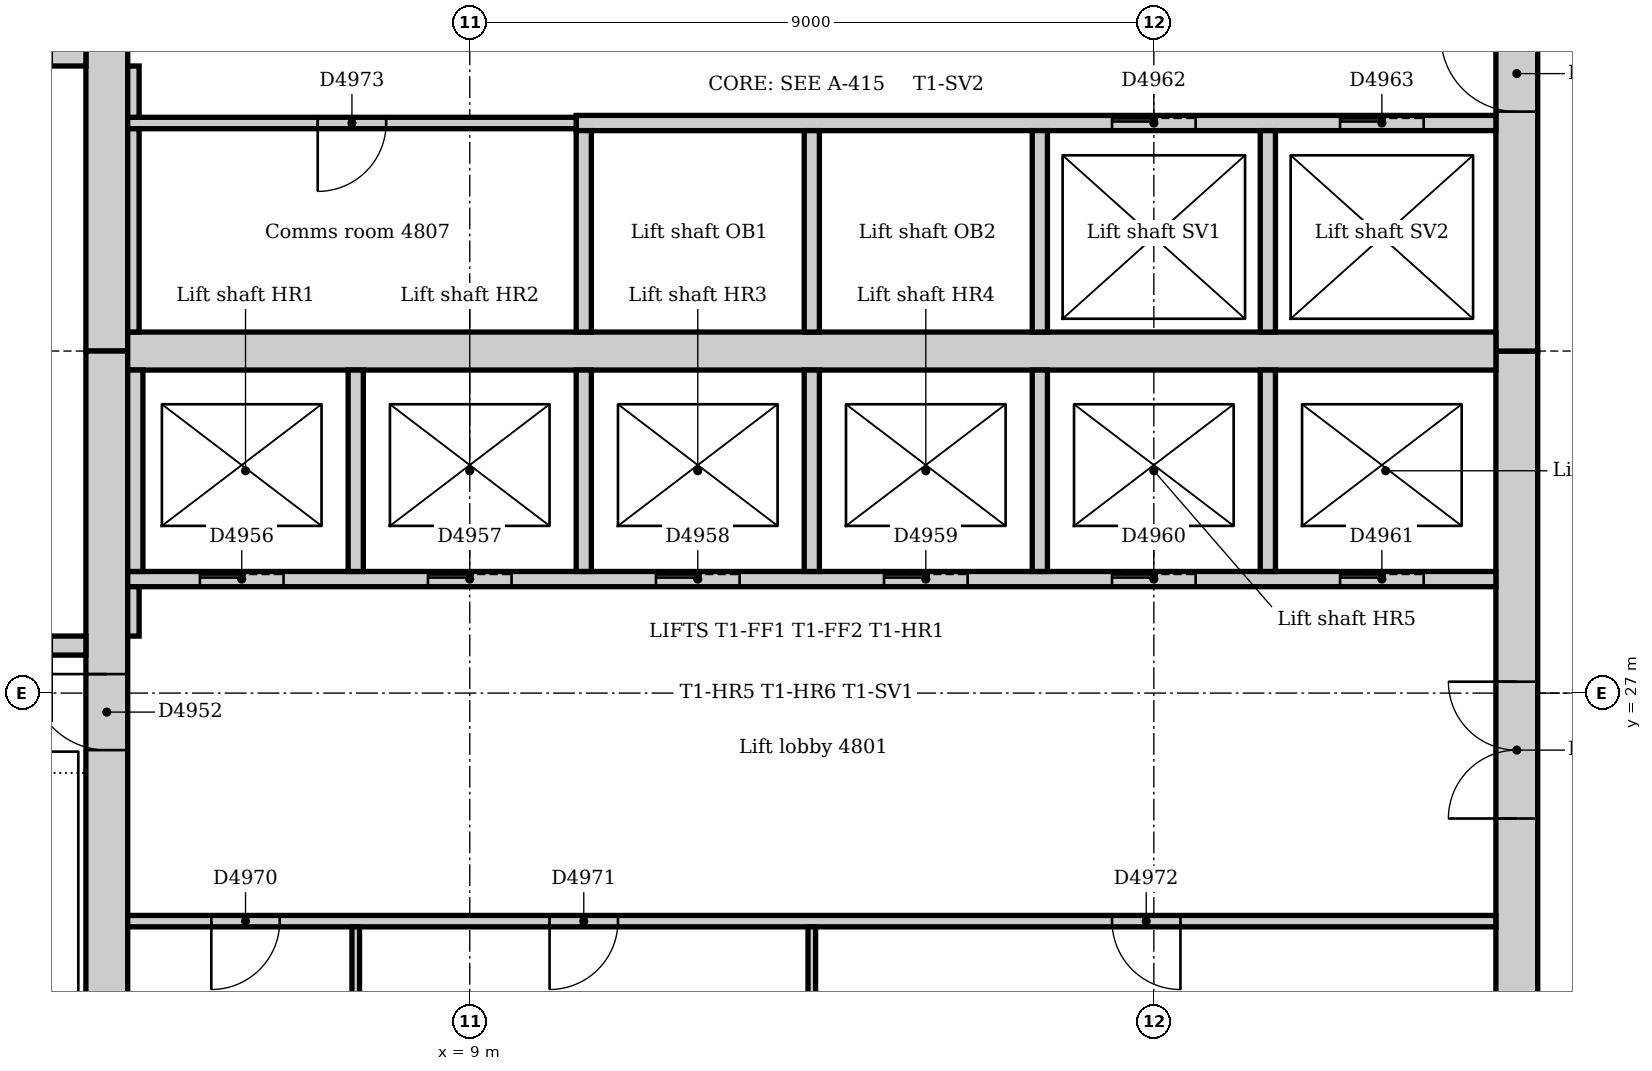
"""IFC4 building model, lengths in metres.
Left out: names, types, materials, properties, quantities, classifications, styles, units other than length and angle.
Written with IfcOpenShell. Run it as: python <this file> out.ifc"""

import sys

from ifc_helpers import new_model, si_unit, direction, frame, frame_2d, origin, place, context, subcontext, project, spatial, rectangle, extrude, element, fill, save


model = new_model("IFC4")
c1 = context("Model", 3, precision=1e-05, world=origin(), true_north=direction((0.0, 1.0)))
c2 = subcontext(c1, "Body", "Model", "MODEL_VIEW")
j1 = project(units=[si_unit("LENGTHUNIT", "METRE"), si_unit("PLANEANGLEUNIT", "RADIAN")], contexts=[c1])
p1 = place(None, origin())
s1 = spatial("IfcSite", under=j1, at=p1, CompositionType="ELEMENT")
p2 = place(p1, origin())
s2 = spatial("IfcBuilding", under=s1, at=p2, CompositionType="ELEMENT")
p3 = place(p2, frame((0.0, 0.0, 202.0)))
s3 = spatial("IfcBuildingStorey", under=s2, at=p3, CompositionType="ELEMENT", Elevation=202.0)
p4 = place(p3, frame((22.775, 21.0, 0.0), z_axis=(0.0, 0.0, 1.0), x_axis=(0.0, 1.0, 0.0)))
e1 = element("IfcWall", 1, at=p4, inside=s3, PredefinedType="SOLIDWALL", context=c2, shape_type="SweptSolid", body=[
    extrude(rectangle(XDim=10.5, YDim=0.55, at=frame_2d((5.25, 0.0))), origin(), (0.0, 0.0, 1.0), 4.0),
])
p5 = place(p4, frame((4.35, 0.0, 0.0)))
e2 = element("IfcOpeningElement", 2, at=p5, cuts=e1, PredefinedType="OPENING", context=c2, shape_type="SweptSolid", body=[
    extrude(rectangle(XDim=1.8, YDim=2.1, at=frame_2d((0.9, 1.05))), frame((0.0, 0.285, 0.0), z_axis=(0.0, -1.0, 0.0), x_axis=(1.0, 0.0, 0.0)), (0.0, 0.0, 1.0), 0.57),
])
p6 = place(p3, frame((22.775, 31.5, 0.0), z_axis=(0.0, 0.0, 1.0), x_axis=(0.0, 1.0, 0.0)))
e3 = element("IfcWall", 3, at=p6, inside=s3, PredefinedType="SOLIDWALL", context=c2, shape_type="SweptSolid", body=[
    extrude(rectangle(XDim=10.5, YDim=0.55, at=frame_2d((5.25, 0.0))), origin(), (0.0, 0.0, 1.0), 4.0),
])
p7 = place(p6, frame((3.15, 0.0, 0.0)))
e4 = element("IfcOpeningElement", 4, at=p7, cuts=e3, PredefinedType="OPENING", context=c2, shape_type="SweptSolid", body=[
    extrude(rectangle(XDim=1.0, YDim=2.1, at=frame_2d((0.5, 1.05))), frame((0.0, 0.285, 0.0), z_axis=(0.0, -1.0, 0.0), x_axis=(1.0, 0.0, 0.0)), (0.0, 0.0, 1.0), 0.57),
])
p8 = place(p6, frame((5.2, 0.0, 0.0)))
e5 = element("IfcOpeningElement", 5, at=p8, cuts=e3, PredefinedType="OPENING", context=c2, shape_type="SweptSolid", body=[
    extrude(rectangle(XDim=1.0, YDim=2.1, at=frame_2d((0.5, 1.05))), frame((0.0, 0.285, 0.0), z_axis=(0.0, -1.0, 0.0), x_axis=(1.0, 0.0, 0.0)), (0.0, 0.0, 1.0), 0.57),
])
p9 = place(p3, frame((4.225, 42.0, 0.0), z_axis=(0.0, 0.0, 1.0), x_axis=(0.0, -1.0, 0.0)))
e6 = element("IfcWall", 6, at=p9, inside=s3, PredefinedType="SOLIDWALL", context=c2, shape_type="SweptSolid", body=[
    extrude(rectangle(XDim=10.5, YDim=0.55, at=frame_2d((5.25, 0.0))), origin(), (0.0, 0.0, 1.0), 4.0),
])
p10 = place(p9, frame((5.3, 0.0, 0.0)))
e7 = element("IfcOpeningElement", 7, at=p10, cuts=e6, PredefinedType="OPENING", context=c2, shape_type="SweptSolid", body=[
    extrude(rectangle(XDim=1.0, YDim=2.1, at=frame_2d((0.5, 1.05))), frame((0.0, 0.285, 0.0), z_axis=(0.0, -1.0, 0.0), x_axis=(1.0, 0.0, 0.0)), (0.0, 0.0, 1.0), 0.57),
])
p11 = place(p3, frame((4.225, 31.5, 0.0), z_axis=(0.0, 0.0, 1.0), x_axis=(0.0, -1.0, 0.0)))
e8 = element("IfcWall", 8, at=p11, inside=s3, PredefinedType="SOLIDWALL", context=c2, shape_type="SweptSolid", body=[
    extrude(rectangle(XDim=10.5, YDim=0.55, at=frame_2d((5.25, 0.0))), origin(), (0.0, 0.0, 1.0), 4.0),
])
p12 = place(p11, frame((4.25, 0.0, 0.0)))
e9 = element("IfcOpeningElement", 9, at=p12, cuts=e8, PredefinedType="OPENING", context=c2, shape_type="SweptSolid", body=[
    extrude(rectangle(XDim=1.0, YDim=2.1, at=frame_2d((0.5, 1.05))), frame((0.0, 0.285, 0.0), z_axis=(0.0, -1.0, 0.0), x_axis=(1.0, 0.0, 0.0)), (0.0, 0.0, 1.0), 0.57),
])
p13 = place(p3, frame((4.5, 31.5, 0.0), z_axis=(0.0, 0.0, 1.0), x_axis=(1.0, 0.0, 0.0)))
e10 = element("IfcWall", 10, at=p13, inside=s3, PredefinedType="SOLIDWALL", context=c2, shape_type="SweptSolid", body=[
    extrude(rectangle(XDim=18.0, YDim=0.5, at=frame_2d((9.0, 0.0))), origin(), (0.0, 0.0, 1.0), 4.0),
])
p14 = place(p3, frame((3.95, 27.625, 0.0), z_axis=(0.0, 0.0, 1.0), x_axis=(-1.0, 0.0, 0.0)))
e11 = element("IfcWall", 11, at=p14, inside=s3, PredefinedType="SOLIDWALL", context=c2, shape_type="SweptSolid", body=[
    extrude(rectangle(XDim=3.59, YDim=0.25, at=frame_2d((1.795, 0.0))), origin(), (0.0, 0.0, 1.0), 4.0),
])
p15 = place(p14, frame((0.45, 0.0, 0.0)))
e12 = element("IfcOpeningElement", 12, at=p15, cuts=e11, PredefinedType="OPENING", context=c2, shape_type="SweptSolid", body=[
    extrude(rectangle(XDim=1.0, YDim=2.1, at=frame_2d((0.5, 1.05))), frame((0.0, 0.135, 0.0), z_axis=(0.0, -1.0, 0.0), x_axis=(1.0, 0.0, 0.0)), (0.0, 0.0, 1.0), 0.27),
])
p16 = place(p3, frame((0.36, 35.375, 0.0), z_axis=(0.0, 0.0, 1.0), x_axis=(1.0, 0.0, 0.0)))
e13 = element("IfcWall", 13, at=p16, inside=s3, PredefinedType="SOLIDWALL", context=c2, shape_type="SweptSolid", body=[
    extrude(rectangle(XDim=3.59, YDim=0.25, at=frame_2d((1.795, 0.0))), origin(), (0.0, 0.0, 1.0), 4.0),
])
p17 = place(p16, frame((2.14, 0.0, 0.0)))
e14 = element("IfcOpeningElement", 14, at=p17, cuts=e13, PredefinedType="OPENING", context=c2, shape_type="SweptSolid", body=[
    extrude(rectangle(XDim=1.0, YDim=2.1, at=frame_2d((0.5, 1.05))), frame((0.0, 0.135, 0.0), z_axis=(0.0, -1.0, 0.0), x_axis=(1.0, 0.0, 0.0)), (0.0, 0.0, 1.0), 0.27),
])
p18 = place(p3, frame((4.5, 28.5, 0.0), z_axis=(0.0, 0.0, 1.0), x_axis=(1.0, 0.0, 0.0)))
e15 = element("IfcWall", 15, at=p18, inside=s3, PredefinedType="PARTITIONING", context=c2, shape_type="SweptSolid", body=[
    extrude(rectangle(XDim=18.0, YDim=0.2, at=frame_2d((9.0, 0.0))), origin(), (0.0, 0.0, 1.0), 3.85),
])
p19 = place(p18, frame((0.95, 0.0, 0.0)))
e16 = element("IfcOpeningElement", 16, at=p19, cuts=e15, PredefinedType="OPENING", context=c2, shape_type="SweptSolid", body=[
    extrude(rectangle(XDim=1.1, YDim=2.1, at=frame_2d((0.55, 1.05))), frame((0.0, 0.11, 0.0), z_axis=(0.0, -1.0, 0.0), x_axis=(1.0, 0.0, 0.0)), (0.0, 0.0, 1.0), 0.22),
])
p20 = place(p18, frame((3.95, 0.0, 0.0)))
e17 = element("IfcOpeningElement", 17, at=p20, cuts=e15, PredefinedType="OPENING", context=c2, shape_type="SweptSolid", body=[
    extrude(rectangle(XDim=1.1, YDim=2.1, at=frame_2d((0.55, 1.05))), frame((0.0, 0.11, 0.0), z_axis=(0.0, -1.0, 0.0), x_axis=(1.0, 0.0, 0.0)), (0.0, 0.0, 1.0), 0.22),
])
p21 = place(p18, frame((6.95, 0.0, 0.0)))
e18 = element("IfcOpeningElement", 18, at=p21, cuts=e15, PredefinedType="OPENING", context=c2, shape_type="SweptSolid", body=[
    extrude(rectangle(XDim=1.1, YDim=2.1, at=frame_2d((0.55, 1.05))), frame((0.0, 0.11, 0.0), z_axis=(0.0, -1.0, 0.0), x_axis=(1.0, 0.0, 0.0)), (0.0, 0.0, 1.0), 0.22),
])
p22 = place(p18, frame((9.95, 0.0, 0.0)))
e19 = element("IfcOpeningElement", 19, at=p22, cuts=e15, PredefinedType="OPENING", context=c2, shape_type="SweptSolid", body=[
    extrude(rectangle(XDim=1.1, YDim=2.1, at=frame_2d((0.55, 1.05))), frame((0.0, 0.11, 0.0), z_axis=(0.0, -1.0, 0.0), x_axis=(1.0, 0.0, 0.0)), (0.0, 0.0, 1.0), 0.22),
])
p23 = place(p18, frame((12.95, 0.0, 0.0)))
e20 = element("IfcOpeningElement", 20, at=p23, cuts=e15, PredefinedType="OPENING", context=c2, shape_type="SweptSolid", body=[
    extrude(rectangle(XDim=1.1, YDim=2.1, at=frame_2d((0.55, 1.05))), frame((0.0, 0.11, 0.0), z_axis=(0.0, -1.0, 0.0), x_axis=(1.0, 0.0, 0.0)), (0.0, 0.0, 1.0), 0.22),
])
p24 = place(p18, frame((15.95, 0.0, 0.0)))
e21 = element("IfcOpeningElement", 21, at=p24, cuts=e15, PredefinedType="OPENING", context=c2, shape_type="SweptSolid", body=[
    extrude(rectangle(XDim=1.1, YDim=2.1, at=frame_2d((0.55, 1.05))), frame((0.0, 0.11, 0.0), z_axis=(0.0, -1.0, 0.0), x_axis=(1.0, 0.0, 0.0)), (0.0, 0.0, 1.0), 0.22),
])
p25 = place(p3, frame((10.4, 34.5, 0.0), z_axis=(0.0, 0.0, 1.0), x_axis=(1.0, 0.0, 0.0)))
e22 = element("IfcWall", 22, at=p25, inside=s3, PredefinedType="PARTITIONING", context=c2, shape_type="SweptSolid", body=[
    extrude(rectangle(XDim=12.1, YDim=0.2, at=frame_2d((6.05, 0.0))), origin(), (0.0, 0.0, 1.0), 3.85),
])
p26 = place(p25, frame((7.05, 0.0, 0.0)))
e23 = element("IfcOpeningElement", 23, at=p26, cuts=e22, PredefinedType="OPENING", context=c2, shape_type="SweptSolid", body=[
    extrude(rectangle(XDim=1.1, YDim=2.1, at=frame_2d((0.55, 1.05))), frame((0.0, 0.11, 0.0), z_axis=(0.0, -1.0, 0.0), x_axis=(1.0, 0.0, 0.0)), (0.0, 0.0, 1.0), 0.22),
])
p27 = place(p25, frame((10.05, 0.0, 0.0)))
e24 = element("IfcOpeningElement", 24, at=p27, cuts=e22, PredefinedType="OPENING", context=c2, shape_type="SweptSolid", body=[
    extrude(rectangle(XDim=1.1, YDim=2.1, at=frame_2d((0.55, 1.05))), frame((0.0, 0.11, 0.0), z_axis=(0.0, -1.0, 0.0), x_axis=(1.0, 0.0, 0.0)), (0.0, 0.0, 1.0), 0.22),
])
for number, where, z_axis, x_axis in (
    (25, (10.5, 28.6, 0.0), (0.0, 0.0, 1.0), (0.0, 1.0, 0.0)),
    (26, (10.5, 31.75, 0.0), (0.0, 0.0, 1.0), (0.0, 1.0, 0.0)),
    (27, (13.5, 28.6, 0.0), (0.0, 0.0, 1.0), (0.0, 1.0, 0.0)),
    (28, (13.5, 31.75, 0.0), (0.0, 0.0, 1.0), (0.0, 1.0, 0.0)),
    (29, (16.5, 28.6, 0.0), (0.0, 0.0, 1.0), (0.0, 1.0, 0.0)),
    (30, (16.5, 31.75, 0.0), (0.0, 0.0, 1.0), (0.0, 1.0, 0.0)),
    (31, (19.5, 28.6, 0.0), (0.0, 0.0, 1.0), (0.0, 1.0, 0.0)),
    (32, (19.5, 31.75, 0.0), (0.0, 0.0, 1.0), (0.0, 1.0, 0.0)),
    (33, (4.6, 28.6, 0.0), (0.0, 0.0, 1.0), (0.0, 1.0, 0.0)),
    (34, (7.5, 28.6, 0.0), (0.0, 0.0, 1.0), (0.0, 1.0, 0.0)),
):
    element("IfcWall", number, at=place(p3, frame(where, z_axis=z_axis, x_axis=x_axis)), inside=s3, PredefinedType="PARTITIONING", context=c2, shape_type="SweptSolid", body=[
        extrude(rectangle(XDim=2.65, YDim=0.2, at=frame_2d((1.325, 0.0))), origin(), (0.0, 0.0, 1.0), 3.85),
    ])
p28 = place(p3, frame((4.5, 24.0, 0.0), z_axis=(0.0, 0.0, 1.0), x_axis=(1.0, 0.0, 0.0)))
e35 = element("IfcWall", 35, at=p28, inside=s3, PredefinedType="PARTITIONING", context=c2, shape_type="SweptSolid", body=[
    extrude(rectangle(XDim=18.0, YDim=0.15, at=frame_2d((9.0, 0.0))), origin(), (0.0, 0.0, 1.0), 3.85),
])
p29 = place(p28, frame((1.1, 0.0, 0.0)))
e36 = element("IfcOpeningElement", 36, at=p29, cuts=e35, PredefinedType="OPENING", context=c2, shape_type="SweptSolid", body=[
    extrude(rectangle(XDim=0.9, YDim=2.1, at=frame_2d((0.45, 1.05))), frame((0.0, 0.085, 0.0), z_axis=(0.0, -1.0, 0.0), x_axis=(1.0, 0.0, 0.0)), (0.0, 0.0, 1.0), 0.17),
])
p30 = place(p28, frame((5.55, 0.0, 0.0)))
e37 = element("IfcOpeningElement", 37, at=p30, cuts=e35, PredefinedType="OPENING", context=c2, shape_type="SweptSolid", body=[
    extrude(rectangle(XDim=0.9, YDim=2.1, at=frame_2d((0.45, 1.05))), frame((0.0, 0.085, 0.0), z_axis=(0.0, -1.0, 0.0), x_axis=(1.0, 0.0, 0.0)), (0.0, 0.0, 1.0), 0.17),
])
p31 = place(p28, frame((12.95, 0.0, 0.0)))
e38 = element("IfcOpeningElement", 38, at=p31, cuts=e35, PredefinedType="OPENING", context=c2, shape_type="SweptSolid", body=[
    extrude(rectangle(XDim=0.9, YDim=2.1, at=frame_2d((0.45, 1.05))), frame((0.0, 0.085, 0.0), z_axis=(0.0, -1.0, 0.0), x_axis=(1.0, 0.0, 0.0)), (0.0, 0.0, 1.0), 0.17),
])
p32 = place(p3, frame((4.5, 34.5, 0.0), z_axis=(0.0, 0.0, 1.0), x_axis=(1.0, 0.0, 0.0)))
e39 = element("IfcWall", 39, at=p32, inside=s3, PredefinedType="PARTITIONING", context=c2, shape_type="SweptSolid", body=[
    extrude(rectangle(XDim=5.9, YDim=0.15, at=frame_2d((2.95, 0.0))), origin(), (0.0, 0.0, 1.0), 3.85),
])
p33 = place(p32, frame((2.5, 0.0, 0.0)))
e40 = element("IfcOpeningElement", 40, at=p33, cuts=e39, PredefinedType="OPENING", context=c2, shape_type="SweptSolid", body=[
    extrude(rectangle(XDim=0.9, YDim=2.1, at=frame_2d((0.45, 1.05))), frame((0.0, 0.085, 0.0), z_axis=(0.0, -1.0, 0.0), x_axis=(1.0, 0.0, 0.0)), (0.0, 0.0, 1.0), 0.17),
])
p34 = place(p3, frame((4.575, 34.575, 0.0), z_axis=(0.0, 0.0, 1.0), x_axis=(0.0, 1.0, 0.0)))
e41 = element("IfcWall", 41, at=p34, inside=s3, PredefinedType="PARTITIONING", context=c2, shape_type="SweptSolid", body=[
    extrude(rectangle(XDim=0.675, YDim=0.15, at=frame_2d((0.338, 0.0))), origin(), (0.0, 0.0, 1.0), 3.85),
])
p35 = place(p3, frame((4.575, 31.75, 0.0), z_axis=(0.0, 0.0, 1.0), x_axis=(0.0, 1.0, 0.0)))
e42 = element("IfcWall", 42, at=p35, inside=s3, PredefinedType="PARTITIONING", context=c2, shape_type="SweptSolid", body=[
    extrude(rectangle(XDim=2.675, YDim=0.15, at=frame_2d((1.337, 0.0))), origin(), (0.0, 0.0, 1.0), 3.85),
])
p36 = place(p3, frame((4.575, 27.75, 0.0), z_axis=(0.0, 0.0, 1.0), x_axis=(0.0, 1.0, 0.0)))
e43 = element("IfcWall", 43, at=p36, inside=s3, PredefinedType="PARTITIONING", context=c2, shape_type="SweptSolid", body=[
    extrude(rectangle(XDim=0.65, YDim=0.15, at=frame_2d((0.325, 0.0))), origin(), (0.0, 0.0, 1.0), 3.85),
])
for number, where, z_axis, x_axis in (
    (44, (7.5, 21.0, 0.0), (0.0, 0.0, 1.0), (0.0, 1.0, 0.0)),
    (45, (13.5, 21.0, 0.0), (0.0, 0.0, 1.0), (0.0, 1.0, 0.0)),
):
    element("IfcWall", number, at=place(p3, frame(where, z_axis=z_axis, x_axis=x_axis)), inside=s3, PredefinedType="PARTITIONING", context=c2, shape_type="SweptSolid", body=[
        extrude(rectangle(XDim=2.925, YDim=0.1, at=frame_2d((1.462, 0.0))), origin(), (0.0, 0.0, 1.0), 3.85),
    ])
p37 = place(p12, frame((1.0, 0.0, 0.0), z_axis=(0.0, 0.0, 1.0), x_axis=(-1.0, 0.0, 0.0)))
e46 = element("IfcDoor", 46, at=p37, inside=s3, OperationType="SINGLE_SWING_RIGHT", PredefinedType="DOOR", context=c2, shape_type="SweptSolid", body=[
    extrude(rectangle(XDim=1.0, YDim=2.1, at=frame_2d((0.5, 1.05))), frame((0.0, 0.025, 0.0), z_axis=(0.0, -1.0, 0.0), x_axis=(1.0, 0.0, 0.0)), (0.0, 0.0, 1.0), 0.05),
])
fill(e9, e46)
p38 = place(p19, origin())
e47 = element("IfcDoor", 47, at=p38, inside=s3, OperationType="SLIDING_TO_LEFT", PredefinedType="DOOR", context=c2, shape_type="SweptSolid", body=[
    extrude(rectangle(XDim=1.1, YDim=2.1, at=frame_2d((0.55, 1.05))), frame((0.0, 0.025, 0.0), z_axis=(0.0, -1.0, 0.0), x_axis=(1.0, 0.0, 0.0)), (0.0, 0.0, 1.0), 0.05),
])
fill(e16, e47)
p39 = place(p20, origin())
e48 = element("IfcDoor", 48, at=p39, inside=s3, OperationType="SLIDING_TO_LEFT", PredefinedType="DOOR", context=c2, shape_type="SweptSolid", body=[
    extrude(rectangle(XDim=1.1, YDim=2.1, at=frame_2d((0.55, 1.05))), frame((0.0, 0.025, 0.0), z_axis=(0.0, -1.0, 0.0), x_axis=(1.0, 0.0, 0.0)), (0.0, 0.0, 1.0), 0.05),
])
fill(e17, e48)
p40 = place(p21, origin())
e49 = element("IfcDoor", 49, at=p40, inside=s3, OperationType="SLIDING_TO_LEFT", PredefinedType="DOOR", context=c2, shape_type="SweptSolid", body=[
    extrude(rectangle(XDim=1.1, YDim=2.1, at=frame_2d((0.55, 1.05))), frame((0.0, 0.025, 0.0), z_axis=(0.0, -1.0, 0.0), x_axis=(1.0, 0.0, 0.0)), (0.0, 0.0, 1.0), 0.05),
])
fill(e18, e49)
p41 = place(p22, origin())
e50 = element("IfcDoor", 50, at=p41, inside=s3, OperationType="SLIDING_TO_LEFT", PredefinedType="DOOR", context=c2, shape_type="SweptSolid", body=[
    extrude(rectangle(XDim=1.1, YDim=2.1, at=frame_2d((0.55, 1.05))), frame((0.0, 0.025, 0.0), z_axis=(0.0, -1.0, 0.0), x_axis=(1.0, 0.0, 0.0)), (0.0, 0.0, 1.0), 0.05),
])
fill(e19, e50)
p42 = place(p23, origin())
e51 = element("IfcDoor", 51, at=p42, inside=s3, OperationType="SLIDING_TO_LEFT", PredefinedType="DOOR", context=c2, shape_type="SweptSolid", body=[
    extrude(rectangle(XDim=1.1, YDim=2.1, at=frame_2d((0.55, 1.05))), frame((0.0, 0.025, 0.0), z_axis=(0.0, -1.0, 0.0), x_axis=(1.0, 0.0, 0.0)), (0.0, 0.0, 1.0), 0.05),
])
fill(e20, e51)
p43 = place(p24, origin())
e52 = element("IfcDoor", 52, at=p43, inside=s3, OperationType="SLIDING_TO_LEFT", PredefinedType="DOOR", context=c2, shape_type="SweptSolid", body=[
    extrude(rectangle(XDim=1.1, YDim=2.1, at=frame_2d((0.55, 1.05))), frame((0.0, 0.025, 0.0), z_axis=(0.0, -1.0, 0.0), x_axis=(1.0, 0.0, 0.0)), (0.0, 0.0, 1.0), 0.05),
])
fill(e21, e52)
p44 = place(p26, origin())
e53 = element("IfcDoor", 53, at=p44, inside=s3, OperationType="SLIDING_TO_LEFT", PredefinedType="DOOR", context=c2, shape_type="SweptSolid", body=[
    extrude(rectangle(XDim=1.1, YDim=2.1, at=frame_2d((0.55, 1.05))), frame((0.0, 0.025, 0.0), z_axis=(0.0, -1.0, 0.0), x_axis=(1.0, 0.0, 0.0)), (0.0, 0.0, 1.0), 0.05),
])
fill(e23, e53)
p45 = place(p27, origin())
e54 = element("IfcDoor", 54, at=p45, inside=s3, OperationType="SLIDING_TO_LEFT", PredefinedType="DOOR", context=c2, shape_type="SweptSolid", body=[
    extrude(rectangle(XDim=1.1, YDim=2.1, at=frame_2d((0.55, 1.05))), frame((0.0, 0.025, 0.0), z_axis=(0.0, -1.0, 0.0), x_axis=(1.0, 0.0, 0.0)), (0.0, 0.0, 1.0), 0.05),
])
fill(e24, e54)
p46 = place(p5, origin())
e55 = element("IfcDoor", 55, at=p46, inside=s3, OperationType="DOUBLE_DOOR_DOUBLE_SWING", PredefinedType="DOOR", context=c2, shape_type="SweptSolid", body=[
    extrude(rectangle(XDim=1.8, YDim=2.1, at=frame_2d((0.9, 1.05))), frame((0.0, 0.025, 0.0), z_axis=(0.0, -1.0, 0.0), x_axis=(1.0, 0.0, 0.0)), (0.0, 0.0, 1.0), 0.05),
])
fill(e2, e55)
p47 = place(p7, origin())
e56 = element("IfcDoor", 56, at=p47, inside=s3, OperationType="SINGLE_SWING_RIGHT", PredefinedType="DOOR", context=c2, shape_type="SweptSolid", body=[
    extrude(rectangle(XDim=1.0, YDim=2.1, at=frame_2d((0.5, 1.05))), frame((0.0, 0.025, 0.0), z_axis=(0.0, -1.0, 0.0), x_axis=(1.0, 0.0, 0.0)), (0.0, 0.0, 1.0), 0.05),
])
fill(e4, e56)
p48 = place(p29, frame((0.9, 0.0, 0.0), z_axis=(0.0, 0.0, 1.0), x_axis=(-1.0, 0.0, 0.0)))
e57 = element("IfcDoor", 57, at=p48, inside=s3, OperationType="SINGLE_SWING_RIGHT", PredefinedType="DOOR", context=c2, shape_type="SweptSolid", body=[
    extrude(rectangle(XDim=0.9, YDim=2.1, at=frame_2d((0.45, 1.05))), frame((0.0, 0.025, 0.0), z_axis=(0.0, -1.0, 0.0), x_axis=(1.0, 0.0, 0.0)), (0.0, 0.0, 1.0), 0.05),
])
fill(e36, e57)
p49 = place(p30, frame((0.9, 0.0, 0.0), z_axis=(0.0, 0.0, 1.0), x_axis=(-1.0, 0.0, 0.0)))
e58 = element("IfcDoor", 58, at=p49, inside=s3, OperationType="SINGLE_SWING_RIGHT", PredefinedType="DOOR", context=c2, shape_type="SweptSolid", body=[
    extrude(rectangle(XDim=0.9, YDim=2.1, at=frame_2d((0.45, 1.05))), frame((0.0, 0.025, 0.0), z_axis=(0.0, -1.0, 0.0), x_axis=(1.0, 0.0, 0.0)), (0.0, 0.0, 1.0), 0.05),
])
fill(e37, e58)
p50 = place(p31, frame((0.9, 0.0, 0.0), z_axis=(0.0, 0.0, 1.0), x_axis=(-1.0, 0.0, 0.0)))
e59 = element("IfcDoor", 59, at=p50, inside=s3, OperationType="SINGLE_SWING_LEFT", PredefinedType="DOOR", context=c2, shape_type="SweptSolid", body=[
    extrude(rectangle(XDim=0.9, YDim=2.1, at=frame_2d((0.45, 1.05))), frame((0.0, 0.025, 0.0), z_axis=(0.0, -1.0, 0.0), x_axis=(1.0, 0.0, 0.0)), (0.0, 0.0, 1.0), 0.05),
])
fill(e38, e59)
p51 = place(p33, frame((0.9, 0.0, 0.0), z_axis=(0.0, 0.0, 1.0), x_axis=(-1.0, 0.0, 0.0)))
e60 = element("IfcDoor", 60, at=p51, inside=s3, OperationType="SINGLE_SWING_RIGHT", PredefinedType="DOOR", context=c2, shape_type="SweptSolid", body=[
    extrude(rectangle(XDim=0.9, YDim=2.1, at=frame_2d((0.45, 1.05))), frame((0.0, 0.025, 0.0), z_axis=(0.0, -1.0, 0.0), x_axis=(1.0, 0.0, 0.0)), (0.0, 0.0, 1.0), 0.05),
])
fill(e40, e60)
save(model, sys.argv[1])
